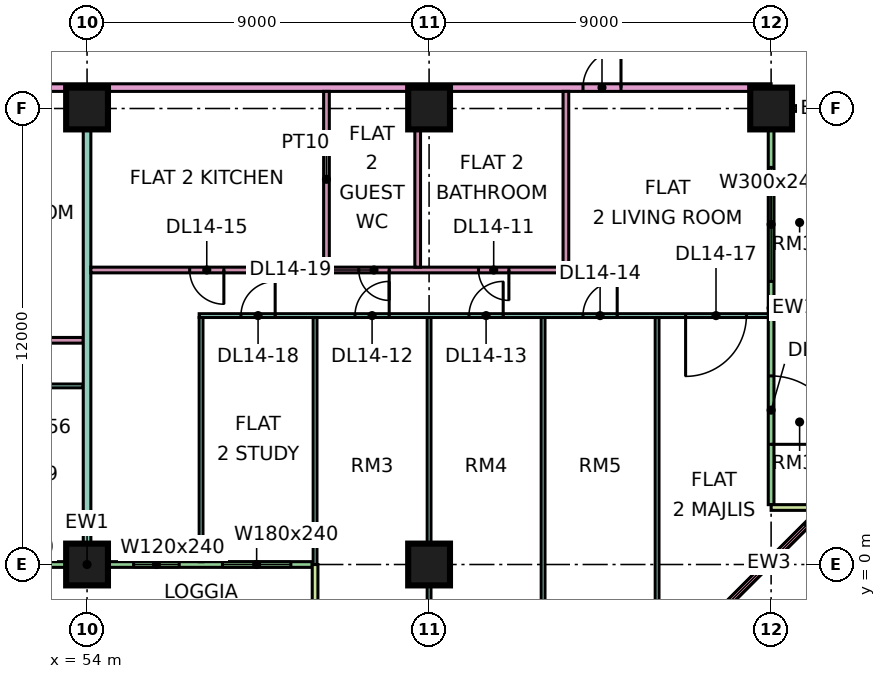
"""IFC4 building model, lengths in metres.
Left out: names, types, materials, properties, quantities, classifications, styles, units other than length and angle.
Written with IfcOpenShell. Run it as: python <this file> out.ifc"""

import sys

from ifc_helpers import new_model, si_unit, direction, frame, frame_2d, origin, origin_2d, place, context, subcontext, project, spatial, rectangle, extrude, element, fill, save


model = new_model("IFC4")
c1 = context("Model", 3, precision=1e-05, world=origin(), true_north=direction((0.0, 1.0)))
c2 = subcontext(c1, "Body", "Model", "MODEL_VIEW")
j1 = project(units=[si_unit("LENGTHUNIT", "METRE"), si_unit("PLANEANGLEUNIT", "RADIAN")], contexts=[c1])
p1 = place(None, origin())
s1 = spatial("IfcSite", under=j1, at=p1, CompositionType="ELEMENT")
p2 = place(p1, origin())
s2 = spatial("IfcBuilding", under=s1, at=p2, CompositionType="ELEMENT")
p3 = place(p2, frame((0.0, 0.0, 67.65)))
s3 = spatial("IfcBuildingStorey", under=s2, at=p3, CompositionType="ELEMENT", Elevation=67.65)
for number, where, z_axis, x_axis in (
    (1, (54.0, 0.0, 0.0), (0.0, 0.0, 1.0), (1.0, 0.0, 0.0)),
    (2, (54.0, 12.0, 0.0), (0.0, 0.0, 1.0), (1.0, 0.0, 0.0)),
    (3, (63.0, 0.0, 0.0), (0.0, 0.0, 1.0), (1.0, 0.0, 0.0)),
    (4, (63.0, 12.0, 0.0), (0.0, 0.0, 1.0), (1.0, 0.0, 0.0)),
    (5, (72.0, 12.0, 0.0), (0.0, 0.0, 1.0), (1.0, 0.0, 0.0)),
):
    element("IfcColumn", number, at=place(p3, frame(where, z_axis=z_axis, x_axis=x_axis)), inside=s3, PredefinedType="COLUMN", context=c2, shape_type="SweptSolid", body=[
        extrude(rectangle(XDim=1.1, YDim=1.1, at=origin_2d()), origin(), (0.0, 0.0, 1.0), 3.75),
    ])
p4 = place(p3, frame((48.075, 0.0, 0.0), z_axis=(0.0, 0.0, 1.0), x_axis=(1.0, 0.0, 0.0)))
e6 = element("IfcWall", 6, at=p4, inside=s3, PredefinedType="SOLIDWALL", context=c2, shape_type="SweptSolid", body=[
    extrude(rectangle(XDim=11.85, YDim=0.15, at=frame_2d((5.925, 0.0))), origin(), (0.0, 0.0, 1.0), 3.35),
])
p5 = place(p4, frame((0.562, 0.0, 0.45)))
e7 = element("IfcOpeningElement", 7, at=p5, cuts=e6, PredefinedType="OPENING", context=c2, shape_type="SweptSolid", body=[
    extrude(rectangle(XDim=1.8, YDim=2.4, at=frame_2d((0.9, 1.2))), frame((0.0, 0.085, 0.0), z_axis=(0.0, -1.0, 0.0), x_axis=(1.0, 0.0, 0.0)), (0.0, 0.0, 1.0), 0.17),
])
p6 = place(p4, frame((3.5, 0.0, 0.45)))
e8 = element("IfcOpeningElement", 8, at=p6, cuts=e6, PredefinedType="OPENING", context=c2, shape_type="SweptSolid", body=[
    extrude(rectangle(XDim=1.2, YDim=2.4, at=frame_2d((0.6, 1.2))), frame((0.0, 0.085, 0.0), z_axis=(0.0, -1.0, 0.0), x_axis=(1.0, 0.0, 0.0)), (0.0, 0.0, 1.0), 0.17),
])
p7 = place(p4, frame((7.15, 0.0, 0.45)))
e9 = element("IfcOpeningElement", 9, at=p7, cuts=e6, PredefinedType="OPENING", context=c2, shape_type="SweptSolid", body=[
    extrude(rectangle(XDim=1.2, YDim=2.4, at=frame_2d((0.6, 1.2))), frame((0.0, 0.085, 0.0), z_axis=(0.0, -1.0, 0.0), x_axis=(1.0, 0.0, 0.0)), (0.0, 0.0, 1.0), 0.17),
])
p8 = place(p4, frame((9.488, 0.0, 0.45)))
e10 = element("IfcOpeningElement", 10, at=p8, cuts=e6, PredefinedType="OPENING", context=c2, shape_type="SweptSolid", body=[
    extrude(rectangle(XDim=1.8, YDim=2.4, at=frame_2d((0.9, 1.2))), frame((0.0, 0.085, 0.0), z_axis=(0.0, -1.0, 0.0), x_axis=(1.0, 0.0, 0.0)), (0.0, 0.0, 1.0), 0.17),
])
p9 = place(p3, frame((60.0, -1.5, 0.0), z_axis=(0.0, 0.0, 1.0), x_axis=(0.0, 1.0, 0.0)))
e11 = element("IfcWall", 11, at=p9, inside=s3, PredefinedType="SOLIDWALL", context=c2, shape_type="SweptSolid", body=[
    extrude(rectangle(XDim=1.5, YDim=0.15, at=frame_2d((0.75, 0.0))), origin(), (0.0, 0.0, 1.0), 3.35),
])
p10 = place(p3, frame((70.447, -1.447, 0.0), z_axis=(0.0, 0.0, 1.0), x_axis=(0.707106781187, 0.707106781187, 0.0)))
e12 = element("IfcWall", 12, at=p10, inside=s3, PredefinedType="SOLIDWALL", context=c2, shape_type="SweptSolid", body=[
    extrude(rectangle(XDim=4.243, YDim=0.15, at=frame_2d((2.121, 0.0))), origin(), (0.0, 0.0, 1.0), 3.35),
])
p11 = place(p10, frame((0.498, 0.0, 0.45)))
e13 = element("IfcOpeningElement", 13, at=p11, cuts=e12, PredefinedType="OPENING", context=c2, shape_type="SweptSolid", body=[
    extrude(rectangle(XDim=3.0, YDim=2.4, at=frame_2d((1.5, 1.2))), frame((0.0, 0.085, 0.0), z_axis=(0.0, -1.0, 0.0), x_axis=(1.0, 0.0, 0.0)), (0.0, 0.0, 1.0), 0.17),
])
p12 = place(p3, frame((72.0, 1.575, 0.0), z_axis=(0.0, 0.0, 1.0), x_axis=(0.0, 1.0, 0.0)))
e14 = element("IfcWall", 14, at=p12, inside=s3, PredefinedType="SOLIDWALL", context=c2, shape_type="SweptSolid", body=[
    extrude(rectangle(XDim=10.35, YDim=0.15, at=frame_2d((5.175, 0.0))), origin(), (0.0, 0.0, 1.0), 3.35),
])
p13 = place(p12, frame((1.587, 0.0, 0.0)))
e15 = element("IfcOpeningElement", 15, at=p13, cuts=e14, PredefinedType="OPENING", context=c2, shape_type="SweptSolid", body=[
    extrude(rectangle(XDim=1.8, YDim=2.4, at=frame_2d((0.9, 1.2))), frame((0.0, 0.085, 0.0), z_axis=(0.0, -1.0, 0.0), x_axis=(1.0, 0.0, 0.0)), (0.0, 0.0, 1.0), 0.17),
])
p14 = place(p12, frame((5.875, 0.0, 0.45)))
e16 = element("IfcOpeningElement", 16, at=p14, cuts=e14, PredefinedType="OPENING", context=c2, shape_type="SweptSolid", body=[
    extrude(rectangle(XDim=3.0, YDim=2.4, at=frame_2d((1.5, 1.2))), frame((0.0, 0.085, 0.0), z_axis=(0.0, -1.0, 0.0), x_axis=(1.0, 0.0, 0.0)), (0.0, 0.0, 1.0), 0.17),
])
for number, where, z_axis, x_axis in (
    (17, (73.5, 1.5, 0.0), (0.0, 0.0, 1.0), (-1.0, 0.0, 0.0)),
    (18, (73.5, 12.0, 0.0), (0.0, 0.0, 1.0), (-1.0, 0.0, 0.0)),
):
    element("IfcWall", number, at=place(p3, frame(where, z_axis=z_axis, x_axis=x_axis)), inside=s3, PredefinedType="SOLIDWALL", context=c2, shape_type="SweptSolid", body=[
        extrude(rectangle(XDim=1.5, YDim=0.15, at=frame_2d((0.75, 0.0))), origin(), (0.0, 0.0, 1.0), 3.35),
    ])
p15 = place(p3, frame((33.05, 4.7, 0.0), z_axis=(0.0, 0.0, 1.0), x_axis=(1.0, 0.0, 0.0)))
e19 = element("IfcWall", 19, at=p15, inside=s3, PredefinedType="PARTITIONING", context=c2, shape_type="SweptSolid", body=[
    extrude(rectangle(XDim=20.85, YDim=0.1, at=frame_2d((10.425, 0.0))), origin(), (0.0, 0.0, 1.0), 3.35),
])
p16 = place(p15, frame((10.0, 0.0, 0.0)))
e20 = element("IfcOpeningElement", 20, at=p16, cuts=e19, PredefinedType="OPENING", context=c2, shape_type="SweptSolid", body=[
    extrude(rectangle(XDim=0.9, YDim=2.1, at=frame_2d((0.45, 1.05))), frame((0.0, 0.06, 0.0), z_axis=(0.0, -1.0, 0.0), x_axis=(1.0, 0.0, 0.0)), (0.0, 0.0, 1.0), 0.12),
])
p17 = place(p15, frame((13.0, 0.0, 0.0)))
e21 = element("IfcOpeningElement", 21, at=p17, cuts=e19, PredefinedType="OPENING", context=c2, shape_type="SweptSolid", body=[
    extrude(rectangle(XDim=0.9, YDim=2.1, at=frame_2d((0.45, 1.05))), frame((0.0, 0.06, 0.0), z_axis=(0.0, -1.0, 0.0), x_axis=(1.0, 0.0, 0.0)), (0.0, 0.0, 1.0), 0.12),
])
p18 = place(p15, frame((16.0, 0.0, 0.0)))
e22 = element("IfcOpeningElement", 22, at=p18, cuts=e19, PredefinedType="OPENING", context=c2, shape_type="SweptSolid", body=[
    extrude(rectangle(XDim=0.9, YDim=2.1, at=frame_2d((0.45, 1.05))), frame((0.0, 0.06, 0.0), z_axis=(0.0, -1.0, 0.0), x_axis=(1.0, 0.0, 0.0)), (0.0, 0.0, 1.0), 0.12),
])
p19 = place(p15, frame((19.0, 0.0, 0.0)))
e23 = element("IfcOpeningElement", 23, at=p19, cuts=e19, PredefinedType="OPENING", context=c2, shape_type="SweptSolid", body=[
    extrude(rectangle(XDim=0.9, YDim=2.1, at=frame_2d((0.45, 1.05))), frame((0.0, 0.06, 0.0), z_axis=(0.0, -1.0, 0.0), x_axis=(1.0, 0.0, 0.0)), (0.0, 0.0, 1.0), 0.12),
])
p20 = place(p15, frame((4.0, 0.0, 0.0)))
e24 = element("IfcOpeningElement", 24, at=p20, cuts=e19, PredefinedType="OPENING", context=c2, shape_type="SweptSolid", body=[
    extrude(rectangle(XDim=0.9, YDim=2.1, at=frame_2d((0.45, 1.05))), frame((0.0, 0.06, 0.0), z_axis=(0.0, -1.0, 0.0), x_axis=(1.0, 0.0, 0.0)), (0.0, 0.0, 1.0), 0.12),
])
p21 = place(p3, frame((40.65, 12.55, 0.0), z_axis=(0.0, 0.0, 1.0), x_axis=(1.0, 0.0, 0.0)))
e25 = element("IfcWall", 25, at=p21, inside=s3, PredefinedType="PARTITIONING", context=c2, shape_type="SweptSolid", body=[
    extrude(rectangle(XDim=31.35, YDim=0.2, at=frame_2d((15.675, 0.0))), origin(), (0.0, 0.0, 1.0), 3.35),
])
p22 = place(p21, frame((26.4, 0.0, 0.0)))
e26 = element("IfcOpeningElement", 26, at=p22, cuts=e25, PredefinedType="OPENING", context=c2, shape_type="SweptSolid", body=[
    extrude(rectangle(XDim=1.0, YDim=2.1, at=frame_2d((0.5, 1.05))), frame((0.0, 0.11, 0.0), z_axis=(0.0, -1.0, 0.0), x_axis=(1.0, 0.0, 0.0)), (0.0, 0.0, 1.0), 0.22),
])
p23 = place(p21, frame((1.05, 0.0, 0.0)))
e27 = element("IfcOpeningElement", 27, at=p23, cuts=e25, PredefinedType="OPENING", context=c2, shape_type="SweptSolid", body=[
    extrude(rectangle(XDim=1.0, YDim=2.1, at=frame_2d((0.5, 1.05))), frame((0.0, 0.11, 0.0), z_axis=(0.0, -1.0, 0.0), x_axis=(1.0, 0.0, 0.0)), (0.0, 0.0, 1.0), 0.22),
])
p24 = place(p3, frame((43.575, 5.9, 0.0), z_axis=(0.0, 0.0, 1.0), x_axis=(1.0, 0.0, 0.0)))
e28 = element("IfcWall", 28, at=p24, inside=s3, PredefinedType="PARTITIONING", context=c2, shape_type="SweptSolid", body=[
    extrude(rectangle(XDim=10.325, YDim=0.15, at=frame_2d((5.163, 0.0))), origin(), (0.0, 0.0, 1.0), 3.35),
])
p25 = place(p24, frame((1.825, 0.0, 0.0)))
e29 = element("IfcOpeningElement", 29, at=p25, cuts=e28, PredefinedType="OPENING", context=c2, shape_type="SweptSolid", body=[
    extrude(rectangle(XDim=0.8, YDim=2.1, at=frame_2d((0.4, 1.05))), frame((0.0, 0.085, 0.0), z_axis=(0.0, -1.0, 0.0), x_axis=(1.0, 0.0, 0.0)), (0.0, 0.0, 1.0), 0.17),
])
p26 = place(p24, frame((6.975, 0.0, 0.0)))
e30 = element("IfcOpeningElement", 30, at=p26, cuts=e28, PredefinedType="OPENING", context=c2, shape_type="SweptSolid", body=[
    extrude(rectangle(XDim=0.9, YDim=2.1, at=frame_2d((0.45, 1.05))), frame((0.0, 0.085, 0.0), z_axis=(0.0, -1.0, 0.0), x_axis=(1.0, 0.0, 0.0)), (0.0, 0.0, 1.0), 0.17),
])
p27 = place(p3, frame((54.0, 0.074, 0.0), z_axis=(0.0, 0.0, 1.0), x_axis=(0.0, 1.0, 0.0)))
e31 = element("IfcWall", 31, at=p27, inside=s3, PredefinedType="PARTITIONING", context=c2, shape_type="SweptSolid", body=[
    extrude(rectangle(XDim=12.376, YDim=0.2, at=frame_2d((6.188, 0.0))), origin(), (0.0, 0.0, 1.0), 3.35),
])
p28 = place(p3, frame((54.1, 7.75, 0.0), z_axis=(0.0, 0.0, 1.0), x_axis=(1.0, 0.0, 0.0)))
e32 = element("IfcWall", 32, at=p28, inside=s3, PredefinedType="PARTITIONING", context=c2, shape_type="SweptSolid", body=[
    extrude(rectangle(XDim=12.575, YDim=0.15, at=frame_2d((6.288, 0.0))), origin(), (0.0, 0.0, 1.0), 3.35),
])
p29 = place(p28, frame((10.2, 0.0, 0.0)))
e33 = element("IfcOpeningElement", 33, at=p29, cuts=e32, PredefinedType="OPENING", context=c2, shape_type="SweptSolid", body=[
    extrude(rectangle(XDim=0.8, YDim=2.1, at=frame_2d((0.4, 1.05))), frame((0.0, 0.085, 0.0), z_axis=(0.0, -1.0, 0.0), x_axis=(1.0, 0.0, 0.0)), (0.0, 0.0, 1.0), 0.17),
])
p30 = place(p28, frame((2.6, 0.0, 0.0)))
e34 = element("IfcOpeningElement", 34, at=p30, cuts=e32, PredefinedType="OPENING", context=c2, shape_type="SweptSolid", body=[
    extrude(rectangle(XDim=0.9, YDim=2.1, at=frame_2d((0.45, 1.05))), frame((0.0, 0.085, 0.0), z_axis=(0.0, -1.0, 0.0), x_axis=(1.0, 0.0, 0.0)), (0.0, 0.0, 1.0), 0.17),
])
p31 = place(p28, frame((7.05, 0.0, 0.0)))
e35 = element("IfcOpeningElement", 35, at=p31, cuts=e32, PredefinedType="OPENING", context=c2, shape_type="SweptSolid", body=[
    extrude(rectangle(XDim=0.8, YDim=2.1, at=frame_2d((0.4, 1.05))), frame((0.0, 0.085, 0.0), z_axis=(0.0, -1.0, 0.0), x_axis=(1.0, 0.0, 0.0)), (0.0, 0.0, 1.0), 0.17),
])
p32 = place(p3, frame((56.95, 6.55, 0.0), z_axis=(0.0, 0.0, 1.0), x_axis=(1.0, 0.0, 0.0)))
e36 = element("IfcWall", 36, at=p32, inside=s3, PredefinedType="PARTITIONING", context=c2, shape_type="SweptSolid", body=[
    extrude(rectangle(XDim=14.976, YDim=0.1, at=frame_2d((7.488, 0.0))), origin(), (0.0, 0.0, 1.0), 3.35),
])
p33 = place(p32, frame((4.1, 0.0, 0.0)))
e37 = element("IfcOpeningElement", 37, at=p33, cuts=e36, PredefinedType="OPENING", context=c2, shape_type="SweptSolid", body=[
    extrude(rectangle(XDim=0.9, YDim=2.1, at=frame_2d((0.45, 1.05))), frame((0.0, 0.06, 0.0), z_axis=(0.0, -1.0, 0.0), x_axis=(1.0, 0.0, 0.0)), (0.0, 0.0, 1.0), 0.12),
])
p34 = place(p32, frame((7.1, 0.0, 0.0)))
e38 = element("IfcOpeningElement", 38, at=p34, cuts=e36, PredefinedType="OPENING", context=c2, shape_type="SweptSolid", body=[
    extrude(rectangle(XDim=0.9, YDim=2.1, at=frame_2d((0.45, 1.05))), frame((0.0, 0.06, 0.0), z_axis=(0.0, -1.0, 0.0), x_axis=(1.0, 0.0, 0.0)), (0.0, 0.0, 1.0), 0.12),
])
p35 = place(p32, frame((10.1, 0.0, 0.0)))
e39 = element("IfcOpeningElement", 39, at=p35, cuts=e36, PredefinedType="OPENING", context=c2, shape_type="SweptSolid", body=[
    extrude(rectangle(XDim=0.9, YDim=2.1, at=frame_2d((0.45, 1.05))), frame((0.0, 0.06, 0.0), z_axis=(0.0, -1.0, 0.0), x_axis=(1.0, 0.0, 0.0)), (0.0, 0.0, 1.0), 0.12),
])
p36 = place(p32, frame((12.8, 0.0, 0.0)))
e40 = element("IfcOpeningElement", 40, at=p36, cuts=e36, PredefinedType="OPENING", context=c2, shape_type="SweptSolid", body=[
    extrude(rectangle(XDim=1.6, YDim=2.1, at=frame_2d((0.8, 1.05))), frame((0.0, 0.06, 0.0), z_axis=(0.0, -1.0, 0.0), x_axis=(1.0, 0.0, 0.0)), (0.0, 0.0, 1.0), 0.12),
])
p37 = place(p32, frame((1.1, 0.0, 0.0)))
e41 = element("IfcOpeningElement", 41, at=p37, cuts=e36, PredefinedType="OPENING", context=c2, shape_type="SweptSolid", body=[
    extrude(rectangle(XDim=0.9, YDim=2.1, at=frame_2d((0.45, 1.05))), frame((0.0, 0.06, 0.0), z_axis=(0.0, -1.0, 0.0), x_axis=(1.0, 0.0, 0.0)), (0.0, 0.0, 1.0), 0.12),
])
p38 = place(p3, frame((57.0, 0.074, 0.0), z_axis=(0.0, 0.0, 1.0), x_axis=(0.0, 1.0, 0.0)))
e42 = element("IfcWall", 42, at=p38, inside=s3, PredefinedType="PARTITIONING", context=c2, shape_type="SweptSolid", body=[
    extrude(rectangle(XDim=6.426, YDim=0.1, at=frame_2d((3.213, 0.0))), origin(), (0.0, 0.0, 1.0), 3.35),
])
p39 = place(p3, frame((60.0, 0.0, 0.0), z_axis=(0.0, 0.0, 1.0), x_axis=(0.0, 1.0, 0.0)))
e43 = element("IfcWall", 43, at=p39, inside=s3, PredefinedType="PARTITIONING", context=c2, shape_type="SweptSolid", body=[
    extrude(rectangle(XDim=6.5, YDim=0.1, at=frame_2d((3.25, 0.0))), origin(), (0.0, 0.0, 1.0), 3.35),
])
for number, where, z_axis, x_axis in (
    (44, (60.3, 7.825, 0.0), (0.0, 0.0, 1.0), (0.0, 1.0, 0.0)),
    (45, (62.7, 7.825, 0.0), (0.0, 0.0, 1.0), (0.0, 1.0, 0.0)),
):
    element("IfcWall", number, at=place(p3, frame(where, z_axis=z_axis, x_axis=x_axis)), inside=s3, PredefinedType="PARTITIONING", context=c2, shape_type="SweptSolid", body=[
        extrude(rectangle(XDim=4.625, YDim=0.15, at=frame_2d((2.312, 0.0))), origin(), (0.0, 0.0, 1.0), 3.35),
    ])
for number, where, z_axis, x_axis in (
    (46, (63.0, -1.351, 0.0), (0.0, 0.0, 1.0), (0.0, 1.0, 0.0)),
    (47, (66.0, -1.351, 0.0), (0.0, 0.0, 1.0), (0.0, 1.0, 0.0)),
):
    element("IfcWall", number, at=place(p3, frame(where, z_axis=z_axis, x_axis=x_axis)), inside=s3, PredefinedType="PARTITIONING", context=c2, shape_type="SweptSolid", body=[
        extrude(rectangle(XDim=7.851, YDim=0.1, at=frame_2d((3.926, 0.0))), origin(), (0.0, 0.0, 1.0), 3.35),
    ])
p40 = place(p3, frame((66.6, 7.825, 0.0), z_axis=(0.0, 0.0, 1.0), x_axis=(0.0, 1.0, 0.0)))
e48 = element("IfcWall", 48, at=p40, inside=s3, PredefinedType="PARTITIONING", context=c2, shape_type="SweptSolid", body=[
    extrude(rectangle(XDim=4.625, YDim=0.15, at=frame_2d((2.312, 0.0))), origin(), (0.0, 0.0, 1.0), 3.35),
])
p41 = place(p3, frame((69.0, -1.351, 0.0), z_axis=(0.0, 0.0, 1.0), x_axis=(0.0, 1.0, 0.0)))
e49 = element("IfcWall", 49, at=p41, inside=s3, PredefinedType="PARTITIONING", context=c2, shape_type="SweptSolid", body=[
    extrude(rectangle(XDim=7.851, YDim=0.1, at=frame_2d((3.926, 0.0))), origin(), (0.0, 0.0, 1.0), 3.35),
])
p42 = place(p7, origin())
e50 = element("IfcWindow", 50, at=p42, inside=s3, PartitioningType="SINGLE_PANEL", PredefinedType="WINDOW", context=c2, shape_type="SweptSolid", body=[
    extrude(rectangle(XDim=1.2, YDim=2.4, at=frame_2d((0.6, 1.2))), frame((0.0, 0.03, 0.0), z_axis=(0.0, -1.0, 0.0), x_axis=(1.0, 0.0, 0.0)), (0.0, 0.0, 1.0), 0.06),
])
fill(e9, e50)
p43 = place(p8, origin())
e51 = element("IfcWindow", 51, at=p43, inside=s3, PartitioningType="SINGLE_PANEL", PredefinedType="WINDOW", context=c2, shape_type="SweptSolid", body=[
    extrude(rectangle(XDim=1.8, YDim=2.4, at=frame_2d((0.9, 1.2))), frame((0.0, 0.03, 0.0), z_axis=(0.0, -1.0, 0.0), x_axis=(1.0, 0.0, 0.0)), (0.0, 0.0, 1.0), 0.06),
])
fill(e10, e51)
p44 = place(p11, origin())
e52 = element("IfcWindow", 52, at=p44, inside=s3, PartitioningType="SINGLE_PANEL", PredefinedType="WINDOW", context=c2, shape_type="SweptSolid", body=[
    extrude(rectangle(XDim=3.0, YDim=2.4, at=frame_2d((1.5, 1.2))), frame((0.0, 0.03, 0.0), z_axis=(0.0, -1.0, 0.0), x_axis=(1.0, 0.0, 0.0)), (0.0, 0.0, 1.0), 0.06),
])
fill(e13, e52)
p45 = place(p13, frame((1.8, 0.0, 0.0), z_axis=(0.0, 0.0, 1.0), x_axis=(-1.0, 0.0, 0.0)))
e53 = element("IfcDoor", 53, at=p45, inside=s3, OperationType="DOUBLE_DOOR_SINGLE_SWING", PredefinedType="DOOR", context=c2, shape_type="SweptSolid", body=[
    extrude(rectangle(XDim=1.8, YDim=2.4, at=frame_2d((0.9, 1.2))), frame((0.0, 0.025, 0.0), z_axis=(0.0, -1.0, 0.0), x_axis=(1.0, 0.0, 0.0)), (0.0, 0.0, 1.0), 0.05),
])
fill(e15, e53)
p46 = place(p14, origin())
e54 = element("IfcWindow", 54, at=p46, inside=s3, PartitioningType="SINGLE_PANEL", PredefinedType="WINDOW", context=c2, shape_type="SweptSolid", body=[
    extrude(rectangle(XDim=3.0, YDim=2.4, at=frame_2d((1.5, 1.2))), frame((0.0, 0.03, 0.0), z_axis=(0.0, -1.0, 0.0), x_axis=(1.0, 0.0, 0.0)), (0.0, 0.0, 1.0), 0.06),
])
fill(e16, e54)
p47 = place(p29, origin())
e55 = element("IfcDoor", 55, at=p47, inside=s3, OperationType="SINGLE_SWING_RIGHT", PredefinedType="DOOR", context=c2, shape_type="SweptSolid", body=[
    extrude(rectangle(XDim=0.8, YDim=2.1, at=frame_2d((0.4, 1.05))), frame((0.0, 0.025, 0.0), z_axis=(0.0, -1.0, 0.0), x_axis=(1.0, 0.0, 0.0)), (0.0, 0.0, 1.0), 0.05),
])
fill(e33, e55)
p48 = place(p33, frame((0.9, 0.0, 0.0), z_axis=(0.0, 0.0, 1.0), x_axis=(-1.0, 0.0, 0.0)))
e56 = element("IfcDoor", 56, at=p48, inside=s3, OperationType="SINGLE_SWING_RIGHT", PredefinedType="DOOR", context=c2, shape_type="SweptSolid", body=[
    extrude(rectangle(XDim=0.9, YDim=2.1, at=frame_2d((0.45, 1.05))), frame((0.0, 0.025, 0.0), z_axis=(0.0, -1.0, 0.0), x_axis=(1.0, 0.0, 0.0)), (0.0, 0.0, 1.0), 0.05),
])
fill(e37, e56)
p49 = place(p34, frame((0.9, 0.0, 0.0), z_axis=(0.0, 0.0, 1.0), x_axis=(-1.0, 0.0, 0.0)))
e57 = element("IfcDoor", 57, at=p49, inside=s3, OperationType="SINGLE_SWING_RIGHT", PredefinedType="DOOR", context=c2, shape_type="SweptSolid", body=[
    extrude(rectangle(XDim=0.9, YDim=2.1, at=frame_2d((0.45, 1.05))), frame((0.0, 0.025, 0.0), z_axis=(0.0, -1.0, 0.0), x_axis=(1.0, 0.0, 0.0)), (0.0, 0.0, 1.0), 0.05),
])
fill(e38, e57)
p50 = place(p35, frame((0.9, 0.0, 0.0), z_axis=(0.0, 0.0, 1.0), x_axis=(-1.0, 0.0, 0.0)))
e58 = element("IfcDoor", 58, at=p50, inside=s3, OperationType="SINGLE_SWING_RIGHT", PredefinedType="DOOR", context=c2, shape_type="SweptSolid", body=[
    extrude(rectangle(XDim=0.9, YDim=2.1, at=frame_2d((0.45, 1.05))), frame((0.0, 0.025, 0.0), z_axis=(0.0, -1.0, 0.0), x_axis=(1.0, 0.0, 0.0)), (0.0, 0.0, 1.0), 0.05),
])
fill(e39, e58)
p51 = place(p30, origin())
e59 = element("IfcDoor", 59, at=p51, inside=s3, OperationType="SINGLE_SWING_RIGHT", PredefinedType="DOOR", context=c2, shape_type="SweptSolid", body=[
    extrude(rectangle(XDim=0.9, YDim=2.1, at=frame_2d((0.45, 1.05))), frame((0.0, 0.025, 0.0), z_axis=(0.0, -1.0, 0.0), x_axis=(1.0, 0.0, 0.0)), (0.0, 0.0, 1.0), 0.05),
])
fill(e34, e59)
p52 = place(p22, frame((1.0, 0.0, 0.0), z_axis=(0.0, 0.0, 1.0), x_axis=(-1.0, 0.0, 0.0)))
e60 = element("IfcDoor", 60, at=p52, inside=s3, OperationType="SINGLE_SWING_RIGHT", PredefinedType="DOOR", context=c2, shape_type="SweptSolid", body=[
    extrude(rectangle(XDim=1.0, YDim=2.1, at=frame_2d((0.5, 1.05))), frame((0.0, 0.025, 0.0), z_axis=(0.0, -1.0, 0.0), x_axis=(1.0, 0.0, 0.0)), (0.0, 0.0, 1.0), 0.05),
])
fill(e26, e60)
p53 = place(p36, frame((1.6, 0.0, 0.0), z_axis=(0.0, 0.0, 1.0), x_axis=(-1.0, 0.0, 0.0)))
e61 = element("IfcDoor", 61, at=p53, inside=s3, OperationType="DOUBLE_DOOR_SINGLE_SWING", PredefinedType="DOOR", context=c2, shape_type="SweptSolid", body=[
    extrude(rectangle(XDim=1.6, YDim=2.1, at=frame_2d((0.8, 1.05))), frame((0.0, 0.025, 0.0), z_axis=(0.0, -1.0, 0.0), x_axis=(1.0, 0.0, 0.0)), (0.0, 0.0, 1.0), 0.05),
])
fill(e40, e61)
p54 = place(p37, frame((0.9, 0.0, 0.0), z_axis=(0.0, 0.0, 1.0), x_axis=(-1.0, 0.0, 0.0)))
e62 = element("IfcDoor", 62, at=p54, inside=s3, OperationType="SINGLE_SWING_RIGHT", PredefinedType="DOOR", context=c2, shape_type="SweptSolid", body=[
    extrude(rectangle(XDim=0.9, YDim=2.1, at=frame_2d((0.45, 1.05))), frame((0.0, 0.025, 0.0), z_axis=(0.0, -1.0, 0.0), x_axis=(1.0, 0.0, 0.0)), (0.0, 0.0, 1.0), 0.05),
])
fill(e41, e62)
p55 = place(p31, origin())
e63 = element("IfcDoor", 63, at=p55, inside=s3, OperationType="SINGLE_SWING_RIGHT", PredefinedType="DOOR", context=c2, shape_type="SweptSolid", body=[
    extrude(rectangle(XDim=0.8, YDim=2.1, at=frame_2d((0.4, 1.05))), frame((0.0, 0.025, 0.0), z_axis=(0.0, -1.0, 0.0), x_axis=(1.0, 0.0, 0.0)), (0.0, 0.0, 1.0), 0.05),
])
fill(e35, e63)
save(model, sys.argv[1])
